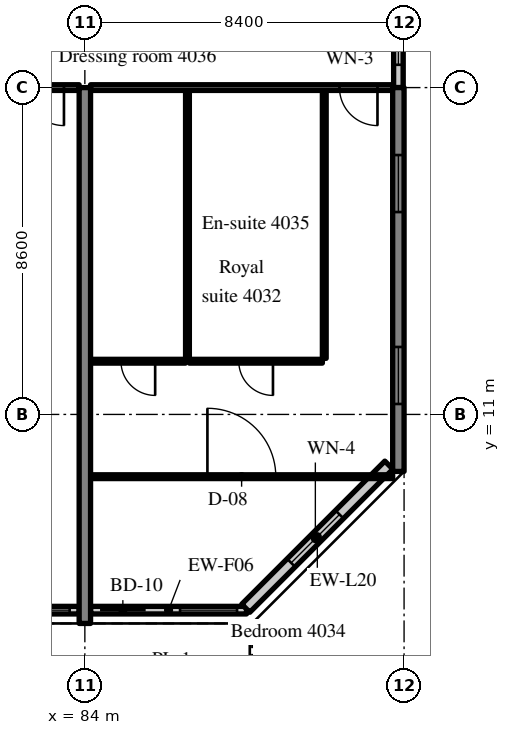
"""IFC4 building model, lengths in metres.
Left out: names, types, materials, properties, quantities, classifications, styles, units other than length and angle.
Written with IfcOpenShell. Run it as: python <this file> out.ifc"""

import sys

from ifc_helpers import new_model, si_unit, direction, frame, frame_2d, origin, place, context, subcontext, project, spatial, rectangle, extrude, source, transform, mapped, element, fill, save


model = new_model("IFC4")
c1 = context("Model", 3, precision=1e-05, world=origin(), true_north=direction((0.0, 1.0)))
c2 = subcontext(c1, "Body", "Model", "MODEL_VIEW")
j1 = project(units=[si_unit("LENGTHUNIT", "METRE"), si_unit("PLANEANGLEUNIT", "RADIAN")], contexts=[c1])
p1 = place(None, origin())
s1 = spatial("IfcSite", under=j1, at=p1, CompositionType="ELEMENT")
p2 = place(p1, origin())
s2 = spatial("IfcBuilding", under=s1, at=p2, CompositionType="ELEMENT")
p3 = place(p2, frame((0.0, 0.0, 166.8)))
s3 = spatial("IfcBuildingStorey", under=s2, at=p3, CompositionType="ELEMENT", Elevation=166.8)
m1 = source(origin(), c2, "Body", "SweptSolid", [
    extrude(rectangle(XDim=14.1, YDim=0.3, at=frame_2d((7.05, 0.0))), origin(), (0.0, 0.0, 1.0), 3.52),
])
p4 = place(p3, frame((84.0, 5.5, 0.0), z_axis=(0.0, 0.0, 1.0), x_axis=(0.0, 1.0, 0.0)))
e1 = element("IfcWall", 1, at=p4, inside=s3, PredefinedType="SHEAR", context=c2, shape_type="MappedRepresentation", body=[
    mapped(m1, transform((0.0, 0.0, 0.0), scale=1.0)),
])
m2 = source(origin(), c2, "Body", "SweptSolid", [
    extrude(rectangle(XDim=10.1, YDim=0.3, at=frame_2d((5.05, 0.0))), origin(), (0.0, 0.0, 1.0), 3.52),
])
p5 = place(p3, frame((92.25, 9.5, 0.0), z_axis=(0.0, 0.0, 1.0), x_axis=(0.0, 1.0, 0.0)))
e2 = element("IfcWall", 2, at=p5, inside=s3, PredefinedType="SHEAR", context=c2, shape_type="MappedRepresentation", body=[
    mapped(m2, transform((0.0, 0.0, 0.0), scale=1.0)),
])
m3 = source(origin(), c2, "Body", "SweptSolid", [
    extrude(rectangle(XDim=1.5, YDim=1.5, at=frame_2d((0.75, 0.75))), frame((0.0, 0.16, 0.0), z_axis=(0.0, -1.0, 0.0), x_axis=(1.0, 0.0, 0.0)), (0.0, 0.0, 1.0), 0.32),
])
p6 = place(p5, frame((1.775, 0.0, 0.9)))
e3 = element("IfcOpeningElement", 3, at=p6, cuts=e2, PredefinedType="OPENING", context=c2, shape_type="MappedRepresentation", body=[
    mapped(m3, transform((0.0, 0.0, 0.0), scale=1.0)),
])
p7 = place(p5, frame((6.825, 0.0, 0.9)))
e4 = element("IfcOpeningElement", 4, at=p7, cuts=e2, PredefinedType="OPENING", context=c2, shape_type="MappedRepresentation", body=[
    mapped(m3, transform((0.0, 0.0, 0.0), scale=1.0)),
])
m4 = source(origin(), c2, "Body", "SweptSolid", [
    extrude(rectangle(XDim=8.1, YDim=0.2, at=frame_2d((4.05, 0.0))), origin(), (0.0, 0.0, 1.0), 2.87),
])
p8 = place(p3, frame((75.75, 5.85, 0.0), z_axis=(0.0, 0.0, 1.0), x_axis=(1.0, 0.0, 0.0)))
e5 = element("IfcWall", 5, at=p8, inside=s3, PredefinedType="SOLIDWALL", context=c2, shape_type="MappedRepresentation", body=[
    mapped(m4, transform((0.0, 0.0, 0.0), scale=1.0)),
])
m5 = source(origin(), c2, "Body", "SweptSolid", [
    extrude(rectangle(XDim=1.2, YDim=2.4, at=frame_2d((0.6, 1.2))), frame((0.0, 0.11, 0.0), z_axis=(0.0, -1.0, 0.0), x_axis=(1.0, 0.0, 0.0)), (0.0, 0.0, 1.0), 0.22),
])
p9 = place(p8, frame((0.25, 0.0, 0.0)))
e6 = element("IfcOpeningElement", 6, at=p9, cuts=e5, PredefinedType="OPENING", context=c2, shape_type="MappedRepresentation", body=[
    mapped(m5, transform((0.0, 0.0, 0.0), scale=1.0)),
])
m6 = source(origin(), c2, "Body", "SweptSolid", [
    extrude(rectangle(XDim=1.5, YDim=1.5, at=frame_2d((0.75, 0.75))), frame((0.0, 0.11, 0.0), z_axis=(0.0, -1.0, 0.0), x_axis=(1.0, 0.0, 0.0)), (0.0, 0.0, 1.0), 0.22),
])
p10 = place(p8, frame((2.3, 0.0, 0.9)))
e7 = element("IfcOpeningElement", 7, at=p10, cuts=e5, PredefinedType="OPENING", context=c2, shape_type="MappedRepresentation", body=[
    mapped(m6, transform((0.0, 0.0, 0.0), scale=1.0)),
])
p11 = place(p8, frame((4.3, 0.0, 0.0)))
e8 = element("IfcOpeningElement", 8, at=p11, cuts=e5, PredefinedType="OPENING", context=c2, shape_type="MappedRepresentation", body=[
    mapped(m5, transform((0.0, 0.0, 0.0), scale=1.0)),
])
p12 = place(p8, frame((6.35, 0.0, 0.9)))
e9 = element("IfcOpeningElement", 9, at=p12, cuts=e5, PredefinedType="OPENING", context=c2, shape_type="MappedRepresentation", body=[
    mapped(m6, transform((0.0, 0.0, 0.0), scale=1.0)),
])
m7 = source(origin(), c2, "Body", "SweptSolid", [
    extrude(rectangle(XDim=4.105, YDim=0.2, at=frame_2d((2.052, 0.0))), origin(), (0.0, 0.0, 1.0), 2.87),
])
p13 = place(p3, frame((84.15, 5.85, 0.0), z_axis=(0.0, 0.0, 1.0), x_axis=(1.0, 0.0, 0.0)))
e10 = element("IfcWall", 10, at=p13, inside=s3, PredefinedType="SOLIDWALL", context=c2, shape_type="MappedRepresentation", body=[
    mapped(m7, transform((0.0, 0.0, 0.0), scale=1.0)),
])
p14 = place(p13, frame((0.25, 0.0, 0.0)))
e11 = element("IfcOpeningElement", 11, at=p14, cuts=e10, PredefinedType="OPENING", context=c2, shape_type="MappedRepresentation", body=[
    mapped(m5, transform((0.0, 0.0, 0.0), scale=1.0)),
])
p15 = place(p13, frame((2.355, 0.0, 0.9)))
e12 = element("IfcOpeningElement", 12, at=p15, cuts=e10, PredefinedType="OPENING", context=c2, shape_type="MappedRepresentation", body=[
    mapped(m6, transform((0.0, 0.0, 0.0), scale=1.0)),
])
m8 = source(origin(), c2, "Body", "SweptSolid", [
    extrude(rectangle(XDim=5.326, YDim=0.3, at=frame_2d((2.663, 0.0))), origin(), (0.0, 0.0, 1.0), 3.52),
])
p16 = place(p3, frame((88.234, 5.9, 0.0), z_axis=(0.0, 0.0, 1.0), x_axis=(0.707083859269, 0.707129702361, 0.0)))
e13 = element("IfcWall", 13, at=p16, inside=s3, PredefinedType="SOLIDWALL", context=c2, shape_type="MappedRepresentation", body=[
    mapped(m8, transform((0.0, 0.0, 0.0), scale=1.0)),
])
m9 = source(origin(), c2, "Body", "SweptSolid", [
    extrude(rectangle(XDim=1.8, YDim=1.5, at=frame_2d((0.9, 0.75))), frame((0.0, 0.16, 0.0), z_axis=(0.0, -1.0, 0.0), x_axis=(1.0, 0.0, 0.0)), (0.0, 0.0, 1.0), 0.32),
])
p17 = place(p16, frame((1.689, 0.0, 0.9)))
e14 = element("IfcOpeningElement", 14, at=p17, cuts=e13, PredefinedType="OPENING", context=c2, shape_type="MappedRepresentation", body=[
    mapped(m9, transform((0.0, 0.0, 0.0), scale=1.0)),
])
m10 = source(origin(), c2, "Body", "SweptSolid", [
    extrude(rectangle(XDim=2.4, YDim=0.25, at=frame_2d((1.2, 0.0))), origin(), (0.0, 0.0, 1.0), 2.62),
])
p18 = place(p3, frame((92.25, 19.6, 0.0), z_axis=(0.0, 0.0, 1.0), x_axis=(0.0, 1.0, 0.0)))
e15 = element("IfcWall", 15, at=p18, inside=s3, PredefinedType="SOLIDWALL", context=c2, shape_type="MappedRepresentation", body=[
    mapped(m10, transform((0.0, 0.0, 0.0), scale=1.0)),
])
m11 = source(origin(), c2, "Body", "SweptSolid", [
    extrude(rectangle(XDim=1.2, YDim=1.5, at=frame_2d((0.6, 0.75))), frame((0.0, 0.135, 0.0), z_axis=(0.0, -1.0, 0.0), x_axis=(1.0, 0.0, 0.0)), (0.0, 0.0, 1.0), 0.27),
])
p19 = place(p18, frame((0.6, 0.0, 0.9)))
e16 = element("IfcOpeningElement", 16, at=p19, cuts=e15, PredefinedType="OPENING", context=c2, shape_type="MappedRepresentation", body=[
    mapped(m11, transform((0.0, 0.0, 0.0), scale=1.0)),
])
m12 = source(origin(), c2, "Body", "SweptSolid", [
    extrude(rectangle(XDim=3.975, YDim=0.15, at=frame_2d((1.988, 0.0))), origin(), (0.0, 0.0, 1.0), 2.82),
])
p20 = place(p3, frame((79.875, 19.6, 0.0), z_axis=(0.0, 0.0, 1.0), x_axis=(1.0, 0.0, 0.0)))
e17 = element("IfcWall", 17, at=p20, inside=s3, PredefinedType="PARTITIONING", context=c2, shape_type="MappedRepresentation", body=[
    mapped(m12, transform((0.0, 0.0, 0.0), scale=1.0)),
])
m13 = source(origin(), c2, "Body", "SweptSolid", [
    extrude(rectangle(XDim=1.0, YDim=2.1, at=frame_2d((0.5, 1.05))), frame((0.0, 0.085, 0.0), z_axis=(0.0, -1.0, 0.0), x_axis=(1.0, 0.0, 0.0)), (0.0, 0.0, 1.0), 0.17),
])
p21 = place(p20, frame((2.575, 0.0, 0.0)))
e18 = element("IfcOpeningElement", 18, at=p21, cuts=e17, PredefinedType="OPENING", context=c2, shape_type="MappedRepresentation", body=[
    mapped(m13, transform((0.0, 0.0, 0.0), scale=1.0)),
])
m14 = source(origin(), c2, "Body", "SweptSolid", [
    extrude(rectangle(XDim=7.05, YDim=0.1, at=frame_2d((3.525, 0.0))), origin(), (0.0, 0.0, 1.0), 3.52),
])
for number, where, z_axis, x_axis in (
    (19, (90.3, 12.475, 0.0), (0.0, 0.0, 1.0), (0.0, 1.0, 0.0)),
    (20, (86.7, 12.475, 0.0), (0.0, 0.0, 1.0), (0.0, 1.0, 0.0)),
):
    element("IfcWall", number, at=place(p3, frame(where, z_axis=z_axis, x_axis=x_axis)), inside=s3, PredefinedType="PARTITIONING", context=c2, shape_type="MappedRepresentation", body=[
        mapped(m14, transform((0.0, 0.0, 0.0), scale=1.0)),
    ])
m15 = source(origin(), c2, "Body", "SweptSolid", [
    extrude(rectangle(XDim=3.5, YDim=0.1, at=frame_2d((1.75, 0.0))), origin(), (0.0, 0.0, 1.0), 3.52),
])
p22 = place(p3, frame((86.75, 12.4, 0.0), z_axis=(0.0, 0.0, 1.0), x_axis=(1.0, 0.0, 0.0)))
e21 = element("IfcWall", 21, at=p22, inside=s3, PredefinedType="PARTITIONING", context=c2, shape_type="MappedRepresentation", body=[
    mapped(m15, transform((0.0, 0.0, 0.0), scale=1.0)),
])
m16 = source(origin(), c2, "Body", "SweptSolid", [
    extrude(rectangle(XDim=0.9, YDim=2.1, at=frame_2d((0.45, 1.05))), frame((0.0, 0.06, 0.0), z_axis=(0.0, -1.0, 0.0), x_axis=(1.0, 0.0, 0.0)), (0.0, 0.0, 1.0), 0.12),
])
p23 = place(p22, frame((1.3, 0.0, 0.0)))
e22 = element("IfcOpeningElement", 22, at=p23, cuts=e21, PredefinedType="OPENING", context=c2, shape_type="MappedRepresentation", body=[
    mapped(m16, transform((0.0, 0.0, 0.0), scale=1.0)),
])
m17 = source(origin(), c2, "Body", "SweptSolid", [
    extrude(rectangle(XDim=2.5, YDim=0.1, at=frame_2d((1.25, 0.0))), origin(), (0.0, 0.0, 1.0), 3.52),
])
p24 = place(p3, frame((84.15, 12.4, 0.0), z_axis=(0.0, 0.0, 1.0), x_axis=(1.0, 0.0, 0.0)))
e23 = element("IfcWall", 23, at=p24, inside=s3, PredefinedType="PARTITIONING", context=c2, shape_type="MappedRepresentation", body=[
    mapped(m17, transform((0.0, 0.0, 0.0), scale=1.0)),
])
p25 = place(p24, frame((0.8, 0.0, 0.0)))
e24 = element("IfcOpeningElement", 24, at=p25, cuts=e23, PredefinedType="OPENING", context=c2, shape_type="MappedRepresentation", body=[
    mapped(m16, transform((0.0, 0.0, 0.0), scale=1.0)),
])
m18 = source(origin(), c2, "Body", "SweptSolid", [
    extrude(rectangle(XDim=7.95, YDim=0.1, at=frame_2d((3.975, 0.0))), origin(), (0.0, 0.0, 1.0), 3.52),
])
p26 = place(p3, frame((84.15, 9.362, 0.0), z_axis=(0.0, 0.0, 1.0), x_axis=(1.0, 0.0, 0.0)))
e25 = element("IfcWall", 25, at=p26, inside=s3, PredefinedType="PARTITIONING", context=c2, shape_type="MappedRepresentation", body=[
    mapped(m18, transform((0.0, 0.0, 0.0), scale=1.0)),
])
m19 = source(origin(), c2, "Body", "SweptSolid", [
    extrude(rectangle(XDim=1.8, YDim=2.1, at=frame_2d((0.9, 1.05))), frame((0.0, 0.06, 0.0), z_axis=(0.0, -1.0, 0.0), x_axis=(1.0, 0.0, 0.0)), (0.0, 0.0, 1.0), 0.12),
])
p27 = place(p26, frame((3.075, 0.0, 0.0)))
e26 = element("IfcOpeningElement", 26, at=p27, cuts=e25, PredefinedType="OPENING", context=c2, shape_type="MappedRepresentation", body=[
    mapped(m19, transform((0.0, 0.0, 0.0), scale=1.0)),
])
m20 = source(origin(), c2, "Body", "SweptSolid", [
    extrude(rectangle(XDim=7.95, YDim=0.15, at=frame_2d((3.975, 0.0))), origin(), (0.0, 0.0, 1.0), 2.82),
])
p28 = place(p3, frame((84.15, 19.6, 0.0), z_axis=(0.0, 0.0, 1.0), x_axis=(1.0, 0.0, 0.0)))
e27 = element("IfcWall", 27, at=p28, inside=s3, PredefinedType="PARTITIONING", context=c2, shape_type="MappedRepresentation", body=[
    mapped(m20, transform((0.0, 0.0, 0.0), scale=1.0)),
])
p29 = place(p28, frame((6.55, 0.0, 0.0)))
e28 = element("IfcOpeningElement", 28, at=p29, cuts=e27, PredefinedType="OPENING", context=c2, shape_type="MappedRepresentation", body=[
    mapped(m13, transform((0.0, 0.0, 0.0), scale=1.0)),
])
m21 = source(origin(), c2, "Body", "SweptSolid", [
    extrude(rectangle(XDim=1.5, YDim=1.5, at=frame_2d((0.75, 0.75))), frame((0.0, 0.03, 0.0), z_axis=(0.0, -1.0, 0.0), x_axis=(1.0, 0.0, 0.0)), (0.0, 0.0, 1.0), 0.06),
])
p30 = place(p12, origin())
e29 = element("IfcWindow", 29, at=p30, inside=s3, PartitioningType="SINGLE_PANEL", PredefinedType="WINDOW", context=c2, shape_type="MappedRepresentation", body=[
    mapped(m21, transform((0.0, 0.0, 0.0), scale=1.0)),
])
fill(e9, e29)
m22 = source(origin(), c2, "Body", "SweptSolid", [
    extrude(rectangle(XDim=1.2, YDim=2.4, at=frame_2d((0.6, 1.2))), frame((0.0, 0.025, 0.0), z_axis=(0.0, -1.0, 0.0), x_axis=(1.0, 0.0, 0.0)), (0.0, 0.0, 1.0), 0.05),
])
p31 = place(p14, origin())
e30 = element("IfcDoor", 30, at=p31, inside=s3, OperationType="SLIDING_TO_RIGHT", PredefinedType="DOOR", context=c2, shape_type="MappedRepresentation", body=[
    mapped(m22, transform((0.0, 0.0, 0.0), scale=1.0)),
])
fill(e11, e30)
p32 = place(p15, origin())
e31 = element("IfcWindow", 31, at=p32, inside=s3, PartitioningType="SINGLE_PANEL", PredefinedType="WINDOW", context=c2, shape_type="MappedRepresentation", body=[
    mapped(m21, transform((0.0, 0.0, 0.0), scale=1.0)),
])
fill(e12, e31)
m23 = source(origin(), c2, "Body", "SweptSolid", [
    extrude(rectangle(XDim=1.8, YDim=1.5, at=frame_2d((0.9, 0.75))), frame((0.0, 0.03, 0.0), z_axis=(0.0, -1.0, 0.0), x_axis=(1.0, 0.0, 0.0)), (0.0, 0.0, 1.0), 0.06),
])
p33 = place(p17, origin())
e32 = element("IfcWindow", 32, at=p33, inside=s3, PartitioningType="SINGLE_PANEL", PredefinedType="WINDOW", context=c2, shape_type="MappedRepresentation", body=[
    mapped(m23, transform((0.0, 0.0, 0.0), scale=1.0)),
])
fill(e14, e32)
p34 = place(p6, origin())
e33 = element("IfcWindow", 33, at=p34, inside=s3, PartitioningType="SINGLE_PANEL", PredefinedType="WINDOW", context=c2, shape_type="MappedRepresentation", body=[
    mapped(m21, transform((0.0, 0.0, 0.0), scale=1.0)),
])
fill(e3, e33)
p35 = place(p7, origin())
e34 = element("IfcWindow", 34, at=p35, inside=s3, PartitioningType="SINGLE_PANEL", PredefinedType="WINDOW", context=c2, shape_type="MappedRepresentation", body=[
    mapped(m21, transform((0.0, 0.0, 0.0), scale=1.0)),
])
fill(e4, e34)
m24 = source(origin(), c2, "Body", "SweptSolid", [
    extrude(rectangle(XDim=1.2, YDim=1.5, at=frame_2d((0.6, 0.75))), frame((0.0, 0.03, 0.0), z_axis=(0.0, -1.0, 0.0), x_axis=(1.0, 0.0, 0.0)), (0.0, 0.0, 1.0), 0.06),
])
p36 = place(p19, origin())
e35 = element("IfcWindow", 35, at=p36, inside=s3, PartitioningType="SINGLE_PANEL", PredefinedType="WINDOW", context=c2, shape_type="MappedRepresentation", body=[
    mapped(m24, transform((0.0, 0.0, 0.0), scale=1.0)),
])
fill(e16, e35)
m25 = source(origin(), c2, "Body", "SweptSolid", [
    extrude(rectangle(XDim=1.0, YDim=2.1, at=frame_2d((0.5, 1.05))), frame((0.0, 0.025, 0.0), z_axis=(0.0, -1.0, 0.0), x_axis=(1.0, 0.0, 0.0)), (0.0, 0.0, 1.0), 0.05),
])
p37 = place(p21, origin())
e36 = element("IfcDoor", 36, at=p37, inside=s3, OperationType="SINGLE_SWING_RIGHT", PredefinedType="DOOR", context=c2, shape_type="MappedRepresentation", body=[
    mapped(m25, transform((0.0, 0.0, 0.0), scale=1.0)),
])
fill(e18, e36)
m26 = source(origin(), c2, "Body", "SweptSolid", [
    extrude(rectangle(XDim=0.9, YDim=2.1, at=frame_2d((0.45, 1.05))), frame((0.0, 0.025, 0.0), z_axis=(0.0, -1.0, 0.0), x_axis=(1.0, 0.0, 0.0)), (0.0, 0.0, 1.0), 0.05),
])
p38 = place(p23, origin())
e37 = element("IfcDoor", 37, at=p38, inside=s3, OperationType="SINGLE_SWING_RIGHT", PredefinedType="DOOR", context=c2, shape_type="MappedRepresentation", body=[
    mapped(m26, transform((0.0, 0.0, 0.0), scale=1.0)),
])
fill(e22, e37)
p39 = place(p25, origin())
e38 = element("IfcDoor", 38, at=p39, inside=s3, OperationType="SINGLE_SWING_RIGHT", PredefinedType="DOOR", context=c2, shape_type="MappedRepresentation", body=[
    mapped(m26, transform((0.0, 0.0, 0.0), scale=1.0)),
])
fill(e24, e38)
m27 = source(origin(), c2, "Body", "SweptSolid", [
    extrude(rectangle(XDim=1.8, YDim=2.1, at=frame_2d((0.9, 1.05))), frame((0.0, 0.025, 0.0), z_axis=(0.0, -1.0, 0.0), x_axis=(1.0, 0.0, 0.0)), (0.0, 0.0, 1.0), 0.05),
])
p40 = place(p27, origin())
e39 = element("IfcDoor", 39, at=p40, inside=s3, OperationType="DOUBLE_DOOR_SINGLE_SWING", PredefinedType="DOOR", context=c2, shape_type="MappedRepresentation", body=[
    mapped(m27, transform((0.0, 0.0, 0.0), scale=1.0)),
])
fill(e26, e39)
p41 = place(p29, origin())
e40 = element("IfcDoor", 40, at=p41, inside=s3, OperationType="SINGLE_SWING_RIGHT", PredefinedType="DOOR", context=c2, shape_type="MappedRepresentation", body=[
    mapped(m25, transform((0.0, 0.0, 0.0), scale=1.0)),
])
fill(e28, e40)
save(model, sys.argv[1])
